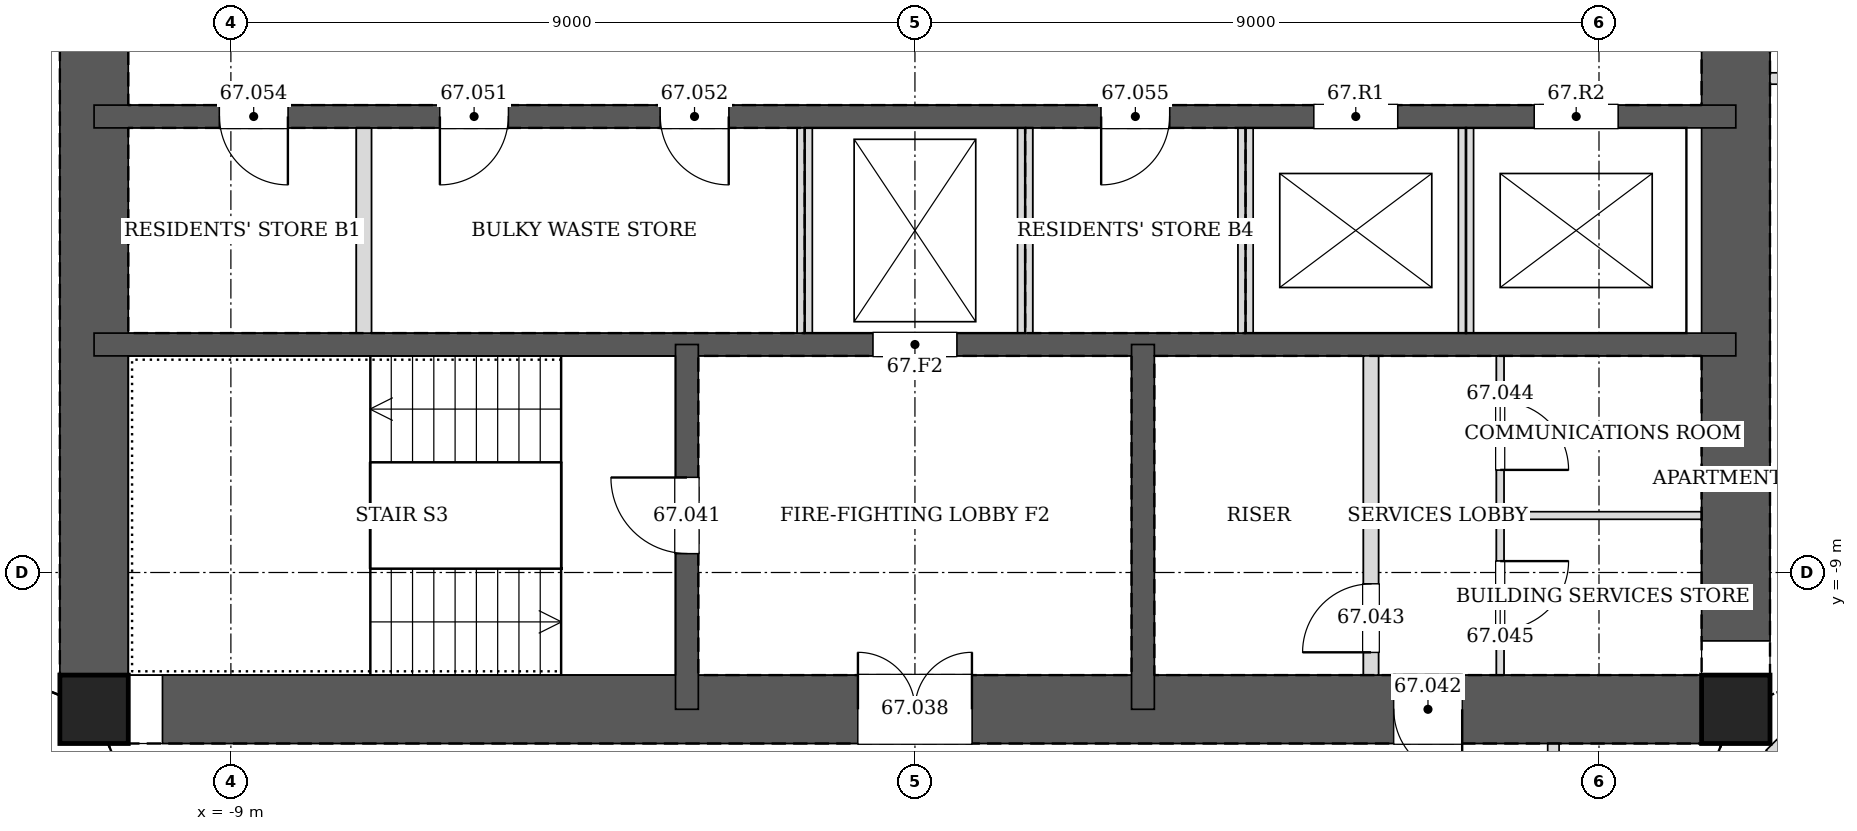
"""IFC4 building model, lengths in metres.
Left out: names, types, materials, properties, quantities, classifications, styles, units other than length and angle.
Written with IfcOpenShell. Run it as: python <this file> out.ifc"""

import sys

from ifc_helpers import new_model, si_unit, direction, frame, frame_2d, origin, origin_2d, place, context, subcontext, project, spatial, rectangle, hollow_rectangle, extrude, element, fill, save


model = new_model("IFC4")
c1 = context("Model", 3, precision=1e-05, world=origin(), true_north=direction((0.0, 1.0)))
c2 = subcontext(c1, "Body", "Model", "MODEL_VIEW")
j1 = project(units=[si_unit("LENGTHUNIT", "METRE"), si_unit("PLANEANGLEUNIT", "RADIAN")], contexts=[c1])
p1 = place(None, origin())
s1 = spatial("IfcSite", under=j1, at=p1, CompositionType="ELEMENT")
p2 = place(p1, origin())
s2 = spatial("IfcBuilding", under=s1, at=p2, CompositionType="ELEMENT")
p3 = place(p2, frame((0.0, 0.0, 277.6)))
s3 = spatial("IfcBuildingStorey", under=s2, at=p3, CompositionType="ELEMENT", Elevation=277.6)
for number, where, z_axis, x_axis in (
    (1, (-10.8, -10.8, 0.0), (0.0, 0.0, 1.0), (1.0, 0.0, 0.0)),
    (2, (10.8, -10.8, 0.0), (0.0, 0.0, 1.0), (1.0, 0.0, 0.0)),
):
    element("IfcColumn", number, at=place(p3, frame(where, z_axis=z_axis, x_axis=x_axis)), inside=s3, PredefinedType="COLUMN", context=c2, shape_type="SweptSolid", body=[
        extrude(hollow_rectangle(XDim=0.9, YDim=0.9, WallThickness=0.04, at=origin_2d()), origin(), (0.0, 0.0, 1.0), 3.4),
    ])
p4 = place(p3, frame((-10.8, -10.8, 0.0), z_axis=(0.0, 0.0, 1.0), x_axis=(1.0, 0.0, 0.0)))
e3 = element("IfcWall", 3, at=p4, inside=s3, PredefinedType="SOLIDWALL", context=c2, shape_type="SweptSolid", body=[
    extrude(rectangle(XDim=21.6, YDim=0.9, at=frame_2d((10.8, 0.0))), origin(), (0.0, 0.0, 1.0), 3.4),
])
p5 = place(p4, frame((10.05, 0.0, 0.0)))
e4 = element("IfcOpeningElement", 4, at=p5, cuts=e3, PredefinedType="OPENING", context=c2, shape_type="SweptSolid", body=[
    extrude(rectangle(XDim=1.5, YDim=2.1, at=frame_2d((0.75, 1.05))), frame((0.0, 0.46, 0.0), z_axis=(0.0, -1.0, 0.0), x_axis=(1.0, 0.0, 0.0)), (0.0, 0.0, 1.0), 0.92),
])
p6 = place(p4, frame((17.1, 0.0, 0.0)))
e5 = element("IfcOpeningElement", 5, at=p6, cuts=e3, PredefinedType="OPENING", context=c2, shape_type="SweptSolid", body=[
    extrude(rectangle(XDim=0.9, YDim=2.1, at=frame_2d((0.45, 1.05))), frame((0.0, 0.46, 0.0), z_axis=(0.0, -1.0, 0.0), x_axis=(1.0, 0.0, 0.0)), (0.0, 0.0, 1.0), 0.92),
])
p7 = place(p3, frame((10.8, -10.8, 0.0), z_axis=(0.0, 0.0, 1.0), x_axis=(0.0, 1.0, 0.0)))
e6 = element("IfcWall", 6, at=p7, inside=s3, PredefinedType="SOLIDWALL", context=c2, shape_type="SweptSolid", body=[
    extrude(rectangle(XDim=21.6, YDim=0.9, at=frame_2d((10.8, 0.0))), origin(), (0.0, 0.0, 1.0), 3.4),
])
p8 = place(p7, frame((11.7, 0.0, 0.0)))
e7 = element("IfcOpeningElement", 7, at=p8, cuts=e6, PredefinedType="OPENING", context=c2, shape_type="SweptSolid", body=[
    extrude(rectangle(XDim=1.2, YDim=2.1, at=frame_2d((0.6, 1.05))), frame((0.0, 0.46, 0.0), z_axis=(0.0, -1.0, 0.0), x_axis=(1.0, 0.0, 0.0)), (0.0, 0.0, 1.0), 0.92),
])
p9 = place(p7, frame((8.7, 0.0, 0.0)))
e8 = element("IfcOpeningElement", 8, at=p9, cuts=e6, PredefinedType="OPENING", context=c2, shape_type="SweptSolid", body=[
    extrude(rectangle(XDim=1.2, YDim=2.1, at=frame_2d((0.6, 1.05))), frame((0.0, 0.46, 0.0), z_axis=(0.0, -1.0, 0.0), x_axis=(1.0, 0.0, 0.0)), (0.0, 0.0, 1.0), 0.92),
])
p10 = place(p3, frame((-10.8, 10.8, 0.0), z_axis=(0.0, 0.0, 1.0), x_axis=(0.0, -1.0, 0.0)))
e9 = element("IfcWall", 9, at=p10, inside=s3, PredefinedType="SOLIDWALL", context=c2, shape_type="SweptSolid", body=[
    extrude(rectangle(XDim=21.6, YDim=0.9, at=frame_2d((10.8, 0.0))), origin(), (0.0, 0.0, 1.0), 3.4),
])
p11 = place(p10, frame((8.7, 0.0, 0.0)))
e10 = element("IfcOpeningElement", 10, at=p11, cuts=e9, PredefinedType="OPENING", context=c2, shape_type="SweptSolid", body=[
    extrude(rectangle(XDim=1.2, YDim=2.1, at=frame_2d((0.6, 1.05))), frame((0.0, 0.46, 0.0), z_axis=(0.0, -1.0, 0.0), x_axis=(1.0, 0.0, 0.0)), (0.0, 0.0, 1.0), 0.92),
])
p12 = place(p10, frame((11.7, 0.0, 0.0)))
e11 = element("IfcOpeningElement", 11, at=p12, cuts=e9, PredefinedType="OPENING", context=c2, shape_type="SweptSolid", body=[
    extrude(rectangle(XDim=1.2, YDim=2.1, at=frame_2d((0.6, 1.05))), frame((0.0, 0.46, 0.0), z_axis=(0.0, -1.0, 0.0), x_axis=(1.0, 0.0, 0.0)), (0.0, 0.0, 1.0), 0.92),
])
p13 = place(p3, frame((-10.8, -3.0, 0.0), z_axis=(0.0, 0.0, 1.0), x_axis=(1.0, 0.0, 0.0)))
e12 = element("IfcWall", 12, at=p13, inside=s3, PredefinedType="SOLIDWALL", context=c2, shape_type="SweptSolid", body=[
    extrude(rectangle(XDim=21.6, YDim=0.3, at=frame_2d((10.8, 0.0))), origin(), (0.0, 0.0, 1.0), 3.4),
])
p14 = place(p13, frame((4.55, 0.0, 0.0)))
e13 = element("IfcOpeningElement", 13, at=p14, cuts=e12, PredefinedType="OPENING", context=c2, shape_type="SweptSolid", body=[
    extrude(rectangle(XDim=0.9, YDim=2.1, at=frame_2d((0.45, 1.05))), frame((0.0, 0.16, 0.0), z_axis=(0.0, -1.0, 0.0), x_axis=(1.0, 0.0, 0.0)), (0.0, 0.0, 1.0), 0.32),
])
p15 = place(p13, frame((7.45, 0.0, 0.0)))
e14 = element("IfcOpeningElement", 14, at=p15, cuts=e12, PredefinedType="OPENING", context=c2, shape_type="SweptSolid", body=[
    extrude(rectangle(XDim=0.9, YDim=2.1, at=frame_2d((0.45, 1.05))), frame((0.0, 0.16, 0.0), z_axis=(0.0, -1.0, 0.0), x_axis=(1.0, 0.0, 0.0)), (0.0, 0.0, 1.0), 0.32),
])
p16 = place(p13, frame((1.65, 0.0, 0.0)))
e15 = element("IfcOpeningElement", 15, at=p16, cuts=e12, PredefinedType="OPENING", context=c2, shape_type="SweptSolid", body=[
    extrude(rectangle(XDim=0.9, YDim=2.1, at=frame_2d((0.45, 1.05))), frame((0.0, 0.16, 0.0), z_axis=(0.0, -1.0, 0.0), x_axis=(1.0, 0.0, 0.0)), (0.0, 0.0, 1.0), 0.32),
])
p17 = place(p13, frame((13.25, 0.0, 0.0)))
e16 = element("IfcOpeningElement", 16, at=p17, cuts=e12, PredefinedType="OPENING", context=c2, shape_type="SweptSolid", body=[
    extrude(rectangle(XDim=0.9, YDim=2.1, at=frame_2d((0.45, 1.05))), frame((0.0, 0.16, 0.0), z_axis=(0.0, -1.0, 0.0), x_axis=(1.0, 0.0, 0.0)), (0.0, 0.0, 1.0), 0.32),
])
p18 = place(p13, frame((16.05, 0.0, 0.0)))
e17 = element("IfcOpeningElement", 17, at=p18, cuts=e12, PredefinedType="OPENING", context=c2, shape_type="SweptSolid", body=[
    extrude(rectangle(XDim=1.1, YDim=2.1, at=frame_2d((0.55, 1.05))), frame((0.0, 0.16, 0.0), z_axis=(0.0, -1.0, 0.0), x_axis=(1.0, 0.0, 0.0)), (0.0, 0.0, 1.0), 0.32),
])
p19 = place(p13, frame((18.95, 0.0, 0.0)))
e18 = element("IfcOpeningElement", 18, at=p19, cuts=e12, PredefinedType="OPENING", context=c2, shape_type="SweptSolid", body=[
    extrude(rectangle(XDim=1.1, YDim=2.1, at=frame_2d((0.55, 1.05))), frame((0.0, 0.16, 0.0), z_axis=(0.0, -1.0, 0.0), x_axis=(1.0, 0.0, 0.0)), (0.0, 0.0, 1.0), 0.32),
])
p20 = place(p3, frame((-10.8, -6.0, 0.0), z_axis=(0.0, 0.0, 1.0), x_axis=(1.0, 0.0, 0.0)))
e19 = element("IfcWall", 19, at=p20, inside=s3, PredefinedType="SOLIDWALL", context=c2, shape_type="SweptSolid", body=[
    extrude(rectangle(XDim=21.6, YDim=0.3, at=frame_2d((10.8, 0.0))), origin(), (0.0, 0.0, 1.0), 3.4),
])
p21 = place(p20, frame((10.25, 0.0, 0.0)))
e20 = element("IfcOpeningElement", 20, at=p21, cuts=e19, PredefinedType="OPENING", context=c2, shape_type="SweptSolid", body=[
    extrude(rectangle(XDim=1.1, YDim=2.1, at=frame_2d((0.55, 1.05))), frame((0.0, 0.16, 0.0), z_axis=(0.0, -1.0, 0.0), x_axis=(1.0, 0.0, 0.0)), (0.0, 0.0, 1.0), 0.32),
])
p22 = place(p3, frame((-3.0, -6.0, 0.0), z_axis=(0.0, 0.0, 1.0), x_axis=(0.0, -1.0, 0.0)))
e21 = element("IfcWall", 21, at=p22, inside=s3, PredefinedType="SOLIDWALL", context=c2, shape_type="SweptSolid", body=[
    extrude(rectangle(XDim=4.8, YDim=0.3, at=frame_2d((2.4, 0.0))), origin(), (0.0, 0.0, 1.0), 3.4),
])
p23 = place(p22, frame((1.75, 0.0, 0.0)))
e22 = element("IfcOpeningElement", 22, at=p23, cuts=e21, PredefinedType="OPENING", context=c2, shape_type="SweptSolid", body=[
    extrude(rectangle(XDim=1.0, YDim=2.1, at=frame_2d((0.5, 1.05))), frame((0.0, 0.16, 0.0), z_axis=(0.0, -1.0, 0.0), x_axis=(1.0, 0.0, 0.0)), (0.0, 0.0, 1.0), 0.32),
])
p24 = place(p3, frame((3.0, -6.0, 0.0), z_axis=(0.0, 0.0, 1.0), x_axis=(0.0, -1.0, 0.0)))
e23 = element("IfcWall", 23, at=p24, inside=s3, PredefinedType="SOLIDWALL", context=c2, shape_type="SweptSolid", body=[
    extrude(rectangle(XDim=4.8, YDim=0.3, at=frame_2d((2.4, 0.0))), origin(), (0.0, 0.0, 1.0), 3.4),
])
p25 = place(p3, frame((11.25, -2.5, 0.0), z_axis=(0.0, 0.0, 1.0), x_axis=(1.0, 0.0, 0.0)))
e24 = element("IfcWall", 24, at=p25, inside=s3, PredefinedType="PARTITIONING", context=c2, shape_type="SweptSolid", body=[
    extrude(rectangle(XDim=1.8, YDim=0.15, at=frame_2d((0.9, 0.0))), origin(), (0.0, 0.0, 1.0), 3.2),
])
p26 = place(p25, frame((0.425, 0.0, 0.0)))
e25 = element("IfcOpeningElement", 25, at=p26, cuts=e24, PredefinedType="OPENING", context=c2, shape_type="SweptSolid", body=[
    extrude(rectangle(XDim=0.95, YDim=2.1, at=frame_2d((0.475, 1.05))), frame((0.0, 0.085, 0.0), z_axis=(0.0, -1.0, 0.0), x_axis=(1.0, 0.0, 0.0)), (0.0, 0.0, 1.0), 0.17),
])
p27 = place(p3, frame((8.4, -13.05, 0.0), z_axis=(0.0, 0.0, 1.0), x_axis=(0.0, 1.0, 0.0)))
e26 = element("IfcWall", 26, at=p27, inside=s3, PredefinedType="PARTITIONING", context=c2, shape_type="SweptSolid", body=[
    extrude(rectangle(XDim=1.8, YDim=0.15, at=frame_2d((0.9, 0.0))), origin(), (0.0, 0.0, 1.0), 3.2),
])
p28 = place(p27, frame((0.425, 0.0, 0.0)))
e27 = element("IfcOpeningElement", 27, at=p28, cuts=e26, PredefinedType="OPENING", context=c2, shape_type="SweptSolid", body=[
    extrude(rectangle(XDim=0.95, YDim=2.1, at=frame_2d((0.475, 1.05))), frame((0.0, 0.085, 0.0), z_axis=(0.0, -1.0, 0.0), x_axis=(1.0, 0.0, 0.0)), (0.0, 0.0, 1.0), 0.17),
])
p29 = place(p3, frame((13.45, -13.45, 0.0), z_axis=(0.0, 0.0, 1.0), x_axis=(-0.707106781187, 0.707106781187, 0.0)))
e28 = element("IfcWall", 28, at=p29, inside=s3, PredefinedType="PARTITIONING", context=c2, shape_type="SweptSolid", body=[
    extrude(rectangle(XDim=3.085, YDim=0.2, at=frame_2d((1.542, 0.0))), origin(), (0.0, 0.0, 1.0), 2.591),
])
for number, where, z_axis, x_axis in (
    (29, (-7.25, -5.85, 0.0), (0.0, 0.0, 1.0), (0.0, 1.0, 0.0)),
    (30, (-1.45, -5.85, 0.0), (0.0, 0.0, 1.0), (0.0, 1.0, 0.0)),
    (31, (1.45, -5.85, 0.0), (0.0, 0.0, 1.0), (0.0, 1.0, 0.0)),
    (32, (4.35, -5.85, 0.0), (0.0, 0.0, 1.0), (0.0, 1.0, 0.0)),
):
    element("IfcWall", number, at=place(p3, frame(where, z_axis=z_axis, x_axis=x_axis)), inside=s3, PredefinedType="PARTITIONING", context=c2, shape_type="SweptSolid", body=[
        extrude(rectangle(XDim=2.7, YDim=0.2, at=frame_2d((1.35, 0.0))), origin(), (0.0, 0.0, 1.0), 3.2),
    ])
p30 = place(p3, frame((7.25, -5.85, 0.0), z_axis=(0.0, 0.0, 1.0), x_axis=(0.0, 1.0, 0.0)))
e33 = element("IfcWall", 33, at=p30, inside=s3, PredefinedType="PARTITIONING", context=c2, shape_type="SweptSolid", body=[
    extrude(rectangle(XDim=2.7, YDim=0.2, at=frame_2d((1.35, 0.0))), origin(), (0.0, 0.0, 1.0), 3.4),
])
p31 = place(p3, frame((6.0, -10.35, 0.0), z_axis=(0.0, 0.0, 1.0), x_axis=(0.0, 1.0, 0.0)))
e34 = element("IfcWall", 34, at=p31, inside=s3, PredefinedType="PARTITIONING", context=c2, shape_type="SweptSolid", body=[
    extrude(rectangle(XDim=4.2, YDim=0.2, at=frame_2d((2.1, 0.0))), origin(), (0.0, 0.0, 1.0), 3.2),
])
p32 = place(p31, frame((0.3, 0.0, 0.0)))
e35 = element("IfcOpeningElement", 35, at=p32, cuts=e34, PredefinedType="OPENING", context=c2, shape_type="SweptSolid", body=[
    extrude(rectangle(XDim=0.9, YDim=2.1, at=frame_2d((0.45, 1.05))), frame((0.0, 0.11, 0.0), z_axis=(0.0, -1.0, 0.0), x_axis=(1.0, 0.0, 0.0)), (0.0, 0.0, 1.0), 0.22),
])
p33 = place(p3, frame((7.7, -10.35, 0.0), z_axis=(0.0, 0.0, 1.0), x_axis=(0.0, 1.0, 0.0)))
e36 = element("IfcWall", 36, at=p33, inside=s3, PredefinedType="PARTITIONING", context=c2, shape_type="SweptSolid", body=[
    extrude(rectangle(XDim=4.2, YDim=0.1, at=frame_2d((2.1, 0.0))), origin(), (0.0, 0.0, 1.0), 3.2),
])
p34 = place(p33, frame((2.7, 0.0, 0.0)))
e37 = element("IfcOpeningElement", 37, at=p34, cuts=e36, PredefinedType="OPENING", context=c2, shape_type="SweptSolid", body=[
    extrude(rectangle(XDim=0.9, YDim=2.1, at=frame_2d((0.45, 1.05))), frame((0.0, 0.06, 0.0), z_axis=(0.0, -1.0, 0.0), x_axis=(1.0, 0.0, 0.0)), (0.0, 0.0, 1.0), 0.12),
])
p35 = place(p33, frame((0.6, 0.0, 0.0)))
e38 = element("IfcOpeningElement", 38, at=p35, cuts=e36, PredefinedType="OPENING", context=c2, shape_type="SweptSolid", body=[
    extrude(rectangle(XDim=0.9, YDim=2.1, at=frame_2d((0.45, 1.05))), frame((0.0, 0.06, 0.0), z_axis=(0.0, -1.0, 0.0), x_axis=(1.0, 0.0, 0.0)), (0.0, 0.0, 1.0), 0.12),
])
p36 = place(p3, frame((7.7, -8.25, 0.0), z_axis=(0.0, 0.0, 1.0), x_axis=(1.0, 0.0, 0.0)))
e39 = element("IfcWall", 39, at=p36, inside=s3, PredefinedType="PARTITIONING", context=c2, shape_type="SweptSolid", body=[
    extrude(rectangle(XDim=2.65, YDim=0.1, at=frame_2d((1.325, 0.0))), origin(), (0.0, 0.0, 1.0), 3.2),
])
p37 = place(p5, origin())
e40 = element("IfcDoor", 40, at=p37, inside=s3, OperationType="DOUBLE_DOOR_SINGLE_SWING", PredefinedType="DOOR", context=c2, shape_type="SweptSolid", body=[
    extrude(rectangle(XDim=1.5, YDim=2.1, at=frame_2d((0.75, 1.05))), frame((0.0, 0.025, 0.0), z_axis=(0.0, -1.0, 0.0), x_axis=(1.0, 0.0, 0.0)), (0.0, 0.0, 1.0), 0.05),
])
fill(e4, e40)
p38 = place(p23, frame((1.0, 0.0, 0.0), z_axis=(0.0, 0.0, 1.0), x_axis=(-1.0, 0.0, 0.0)))
e41 = element("IfcDoor", 41, at=p38, inside=s3, OperationType="SINGLE_SWING_RIGHT", PredefinedType="DOOR", context=c2, shape_type="SweptSolid", body=[
    extrude(rectangle(XDim=1.0, YDim=2.1, at=frame_2d((0.5, 1.05))), frame((0.0, 0.025, 0.0), z_axis=(0.0, -1.0, 0.0), x_axis=(1.0, 0.0, 0.0)), (0.0, 0.0, 1.0), 0.05),
])
fill(e22, e41)
p39 = place(p6, frame((0.9, 0.0, 0.0), z_axis=(0.0, 0.0, 1.0), x_axis=(-1.0, 0.0, 0.0)))
e42 = element("IfcDoor", 42, at=p39, inside=s3, OperationType="SINGLE_SWING_LEFT", PredefinedType="DOOR", context=c2, shape_type="SweptSolid", body=[
    extrude(rectangle(XDim=0.9, YDim=2.1, at=frame_2d((0.45, 1.05))), frame((0.0, 0.025, 0.0), z_axis=(0.0, -1.0, 0.0), x_axis=(1.0, 0.0, 0.0)), (0.0, 0.0, 1.0), 0.05),
])
fill(e5, e42)
p40 = place(p32, origin())
e43 = element("IfcDoor", 43, at=p40, inside=s3, OperationType="SINGLE_SWING_LEFT", PredefinedType="DOOR", context=c2, shape_type="SweptSolid", body=[
    extrude(rectangle(XDim=0.9, YDim=2.1, at=frame_2d((0.45, 1.05))), frame((0.0, 0.025, 0.0), z_axis=(0.0, -1.0, 0.0), x_axis=(1.0, 0.0, 0.0)), (0.0, 0.0, 1.0), 0.05),
])
fill(e35, e43)
p41 = place(p34, frame((0.9, 0.0, 0.0), z_axis=(0.0, 0.0, 1.0), x_axis=(-1.0, 0.0, 0.0)))
e44 = element("IfcDoor", 44, at=p41, inside=s3, OperationType="SINGLE_SWING_RIGHT", PredefinedType="DOOR", context=c2, shape_type="SweptSolid", body=[
    extrude(rectangle(XDim=0.9, YDim=2.1, at=frame_2d((0.45, 1.05))), frame((0.0, 0.025, 0.0), z_axis=(0.0, -1.0, 0.0), x_axis=(1.0, 0.0, 0.0)), (0.0, 0.0, 1.0), 0.05),
])
fill(e37, e44)
p42 = place(p35, frame((0.9, 0.0, 0.0), z_axis=(0.0, 0.0, 1.0), x_axis=(-1.0, 0.0, 0.0)))
e45 = element("IfcDoor", 45, at=p42, inside=s3, OperationType="SINGLE_SWING_LEFT", PredefinedType="DOOR", context=c2, shape_type="SweptSolid", body=[
    extrude(rectangle(XDim=0.9, YDim=2.1, at=frame_2d((0.45, 1.05))), frame((0.0, 0.025, 0.0), z_axis=(0.0, -1.0, 0.0), x_axis=(1.0, 0.0, 0.0)), (0.0, 0.0, 1.0), 0.05),
])
fill(e38, e45)
p43 = place(p14, frame((0.9, 0.0, 0.0), z_axis=(0.0, 0.0, 1.0), x_axis=(-1.0, 0.0, 0.0)))
e46 = element("IfcDoor", 46, at=p43, inside=s3, OperationType="SINGLE_SWING_RIGHT", PredefinedType="DOOR", context=c2, shape_type="SweptSolid", body=[
    extrude(rectangle(XDim=0.9, YDim=2.1, at=frame_2d((0.45, 1.05))), frame((0.0, 0.025, 0.0), z_axis=(0.0, -1.0, 0.0), x_axis=(1.0, 0.0, 0.0)), (0.0, 0.0, 1.0), 0.05),
])
fill(e13, e46)
p44 = place(p15, frame((0.9, 0.0, 0.0), z_axis=(0.0, 0.0, 1.0), x_axis=(-1.0, 0.0, 0.0)))
e47 = element("IfcDoor", 47, at=p44, inside=s3, OperationType="SINGLE_SWING_LEFT", PredefinedType="DOOR", context=c2, shape_type="SweptSolid", body=[
    extrude(rectangle(XDim=0.9, YDim=2.1, at=frame_2d((0.45, 1.05))), frame((0.0, 0.025, 0.0), z_axis=(0.0, -1.0, 0.0), x_axis=(1.0, 0.0, 0.0)), (0.0, 0.0, 1.0), 0.05),
])
fill(e14, e47)
p45 = place(p16, frame((0.9, 0.0, 0.0), z_axis=(0.0, 0.0, 1.0), x_axis=(-1.0, 0.0, 0.0)))
e48 = element("IfcDoor", 48, at=p45, inside=s3, OperationType="SINGLE_SWING_LEFT", PredefinedType="DOOR", context=c2, shape_type="SweptSolid", body=[
    extrude(rectangle(XDim=0.9, YDim=2.1, at=frame_2d((0.45, 1.05))), frame((0.0, 0.025, 0.0), z_axis=(0.0, -1.0, 0.0), x_axis=(1.0, 0.0, 0.0)), (0.0, 0.0, 1.0), 0.05),
])
fill(e15, e48)
p46 = place(p17, frame((0.9, 0.0, 0.0), z_axis=(0.0, 0.0, 1.0), x_axis=(-1.0, 0.0, 0.0)))
e49 = element("IfcDoor", 49, at=p46, inside=s3, OperationType="SINGLE_SWING_RIGHT", PredefinedType="DOOR", context=c2, shape_type="SweptSolid", body=[
    extrude(rectangle(XDim=0.9, YDim=2.1, at=frame_2d((0.45, 1.05))), frame((0.0, 0.025, 0.0), z_axis=(0.0, -1.0, 0.0), x_axis=(1.0, 0.0, 0.0)), (0.0, 0.0, 1.0), 0.05),
])
fill(e16, e49)
p47 = place(p21, origin())
e50 = element("IfcDoor", 50, at=p47, inside=s3, OperationType="DOUBLE_DOOR_SLIDING", PredefinedType="DOOR", context=c2, shape_type="SweptSolid", body=[
    extrude(rectangle(XDim=1.1, YDim=2.1, at=frame_2d((0.55, 1.05))), frame((0.0, 0.025, 0.0), z_axis=(0.0, -1.0, 0.0), x_axis=(1.0, 0.0, 0.0)), (0.0, 0.0, 1.0), 0.05),
])
fill(e20, e50)
p48 = place(p18, origin())
e51 = element("IfcDoor", 51, at=p48, inside=s3, OperationType="DOUBLE_DOOR_SLIDING", PredefinedType="DOOR", context=c2, shape_type="SweptSolid", body=[
    extrude(rectangle(XDim=1.1, YDim=2.1, at=frame_2d((0.55, 1.05))), frame((0.0, 0.025, 0.0), z_axis=(0.0, -1.0, 0.0), x_axis=(1.0, 0.0, 0.0)), (0.0, 0.0, 1.0), 0.05),
])
fill(e17, e51)
p49 = place(p19, origin())
e52 = element("IfcDoor", 52, at=p49, inside=s3, OperationType="DOUBLE_DOOR_SLIDING", PredefinedType="DOOR", context=c2, shape_type="SweptSolid", body=[
    extrude(rectangle(XDim=1.1, YDim=2.1, at=frame_2d((0.55, 1.05))), frame((0.0, 0.025, 0.0), z_axis=(0.0, -1.0, 0.0), x_axis=(1.0, 0.0, 0.0)), (0.0, 0.0, 1.0), 0.05),
])
fill(e18, e52)
save(model, sys.argv[1])
